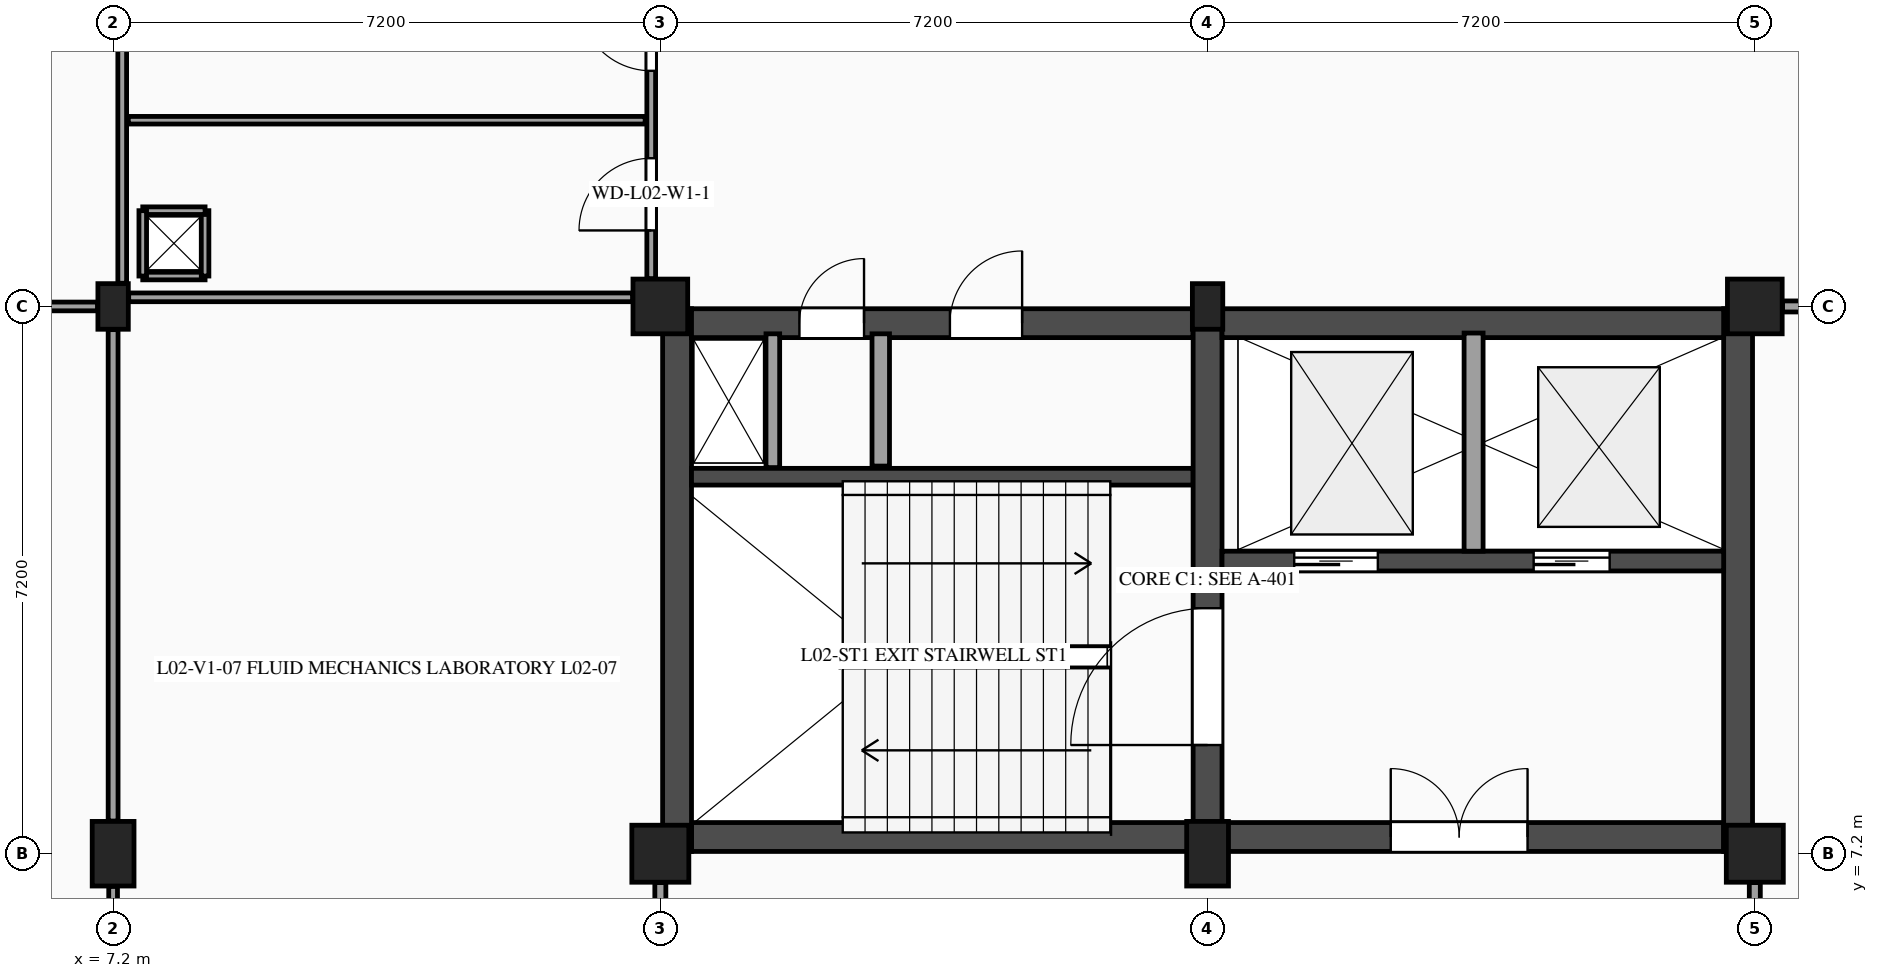
"""IFC4 building model, lengths in metres.
Left out: names, types, materials, properties, quantities, classifications, styles, units other than length and angle.
Written with IfcOpenShell. Run it as: python <this file> out.ifc"""

import sys

from ifc_helpers import new_model, si_unit, direction, frame, frame_2d, origin, origin_2d, place, context, subcontext, project, spatial, rectangle, extrude, element, fill, save


model = new_model("IFC4")
c1 = context("Model", 3, precision=1e-05, world=origin(), true_north=direction((0.0, 1.0)))
c2 = subcontext(c1, "Body", "Model", "MODEL_VIEW")
j1 = project(units=[si_unit("LENGTHUNIT", "METRE"), si_unit("PLANEANGLEUNIT", "RADIAN")], contexts=[c1])
p1 = place(None, origin())
s1 = spatial("IfcSite", under=j1, at=p1, CompositionType="ELEMENT")
p2 = place(p1, origin())
s2 = spatial("IfcBuilding", under=s1, at=p2, CompositionType="ELEMENT")
p3 = place(p2, frame((0.0, 0.0, 9.9)))
s3 = spatial("IfcBuildingStorey", under=s2, at=p3, CompositionType="ELEMENT", Elevation=9.9)
p4 = place(p3, frame((7.2, 7.2, 0.0), z_axis=(0.0, 0.0, 1.0), x_axis=(1.0, 0.0, 0.0)))
e1 = element("IfcColumn", 1, at=p4, inside=s3, PredefinedType="COLUMN", context=c2, shape_type="SweptSolid", body=[
    extrude(rectangle(XDim=0.55, YDim=0.85, at=origin_2d()), origin(), (0.0, 0.0, 1.0), 4.5),
])
p5 = place(p3, frame((7.2, 14.4, 0.0), z_axis=(0.0, 0.0, 1.0), x_axis=(1.0, 0.0, 0.0)))
e2 = element("IfcColumn", 2, at=p5, inside=s3, PredefinedType="PILASTER", context=c2, shape_type="SweptSolid", body=[
    extrude(rectangle(XDim=0.4, YDim=0.6, at=origin_2d()), origin(), (0.0, 0.0, 1.0), 4.5),
])
p6 = place(p3, frame((14.4, 7.2, 0.0), z_axis=(0.0, 0.0, 1.0), x_axis=(1.0, 0.0, 0.0)))
e3 = element("IfcColumn", 3, at=p6, inside=s3, PredefinedType="COLUMN", context=c2, shape_type="SweptSolid", body=[
    extrude(rectangle(XDim=0.75, YDim=0.75, at=origin_2d()), origin(), (0.0, 0.0, 1.0), 4.5),
])
p7 = place(p3, frame((14.4, 14.4, 0.0), z_axis=(0.0, 0.0, 1.0), x_axis=(1.0, 0.0, 0.0)))
e4 = element("IfcColumn", 4, at=p7, inside=s3, PredefinedType="COLUMN", context=c2, shape_type="SweptSolid", body=[
    extrude(rectangle(XDim=0.72, YDim=0.72, at=origin_2d()), origin(), (0.0, 0.0, 1.0), 4.5),
])
p8 = place(p3, frame((21.6, 7.2, 0.0), z_axis=(0.0, 0.0, 1.0), x_axis=(1.0, 0.0, 0.0)))
e5 = element("IfcColumn", 5, at=p8, inside=s3, PredefinedType="COLUMN", context=c2, shape_type="SweptSolid", body=[
    extrude(rectangle(XDim=0.55, YDim=0.85, at=origin_2d()), origin(), (0.0, 0.0, 1.0), 4.5),
])
p9 = place(p3, frame((21.6, 14.4, 0.0), z_axis=(0.0, 0.0, 1.0), x_axis=(1.0, 0.0, 0.0)))
e6 = element("IfcColumn", 6, at=p9, inside=s3, PredefinedType="PILASTER", context=c2, shape_type="SweptSolid", body=[
    extrude(rectangle(XDim=0.4, YDim=0.6, at=origin_2d()), origin(), (0.0, 0.0, 1.0), 4.5),
])
p10 = place(p3, frame((28.8, 7.2, 0.0), z_axis=(0.0, 0.0, 1.0), x_axis=(1.0, 0.0, 0.0)))
e7 = element("IfcColumn", 7, at=p10, inside=s3, PredefinedType="COLUMN", context=c2, shape_type="SweptSolid", body=[
    extrude(rectangle(XDim=0.75, YDim=0.75, at=origin_2d()), origin(), (0.0, 0.0, 1.0), 4.5),
])
p11 = place(p3, frame((28.8, 14.4, 0.0), z_axis=(0.0, 0.0, 1.0), x_axis=(1.0, 0.0, 0.0)))
e8 = element("IfcColumn", 8, at=p11, inside=s3, PredefinedType="COLUMN", context=c2, shape_type="SweptSolid", body=[
    extrude(rectangle(XDim=0.72, YDim=0.72, at=origin_2d()), origin(), (0.0, 0.0, 1.0), 4.5),
])
p12 = place(p3, frame((14.81, 7.42, 0.0), z_axis=(0.0, 0.0, 1.0), x_axis=(1.0, 0.0, 0.0)))
e9 = element("IfcWall", 9, at=p12, inside=s3, PredefinedType="SHEAR", context=c2, shape_type="SweptSolid", body=[
    extrude(rectangle(XDim=6.6, YDim=0.38, at=frame_2d((3.3, 0.0))), origin(), (0.0, 0.0, 1.0), 4.225),
])
p13 = place(p3, frame((14.62, 14.37, 0.0), z_axis=(0.0, 0.0, 1.0), x_axis=(0.0, -1.0, 0.0)))
e10 = element("IfcWall", 10, at=p13, inside=s3, PredefinedType="SHEAR", context=c2, shape_type="SweptSolid", body=[
    extrude(rectangle(XDim=7.14, YDim=0.38, at=frame_2d((3.57, 0.0))), origin(), (0.0, 0.0, 1.0), 4.225),
])
p14 = place(p3, frame((14.81, 14.18, 0.0), z_axis=(0.0, 0.0, 1.0), x_axis=(1.0, 0.0, 0.0)))
e11 = element("IfcWall", 11, at=p14, inside=s3, PredefinedType="SHEAR", context=c2, shape_type="SweptSolid", body=[
    extrude(rectangle(XDim=6.6, YDim=0.38, at=frame_2d((3.3, 0.0))), origin(), (0.0, 0.0, 1.0), 4.225),
])
p15 = place(p14, frame((1.42, 0.0, 0.0)))
e12 = element("IfcOpeningElement", 12, at=p15, cuts=e11, PredefinedType="OPENING", context=c2, shape_type="SweptSolid", body=[
    extrude(rectangle(XDim=0.85, YDim=2.1, at=frame_2d((0.425, 1.05))), frame((0.0, 0.2, 0.0), z_axis=(0.0, -1.0, 0.0), x_axis=(1.0, 0.0, 0.0)), (0.0, 0.0, 1.0), 0.4),
])
p16 = place(p14, frame((3.4, 0.0, 0.0)))
e13 = element("IfcOpeningElement", 13, at=p16, cuts=e11, PredefinedType="OPENING", context=c2, shape_type="SweptSolid", body=[
    extrude(rectangle(XDim=0.95, YDim=2.15, at=frame_2d((0.475, 1.075))), frame((0.0, 0.2, 0.0), z_axis=(0.0, -1.0, 0.0), x_axis=(1.0, 0.0, 0.0)), (0.0, 0.0, 1.0), 0.4),
])
p17 = place(p3, frame((14.81, 12.16, 0.0), z_axis=(0.0, 0.0, 1.0), x_axis=(1.0, 0.0, 0.0)))
e14 = element("IfcWall", 14, at=p17, inside=s3, PredefinedType="SHEAR", context=c2, shape_type="SweptSolid", body=[
    extrude(rectangle(XDim=6.6, YDim=0.22, at=frame_2d((3.3, 0.0))), origin(), (0.0, 0.0, 1.0), 4.225),
])
p18 = place(p3, frame((17.3, 12.3, 0.0), z_axis=(0.0, 0.0, 1.0), x_axis=(0.0, 1.0, 0.0)))
e15 = element("IfcWall", 15, at=p18, inside=s3, PredefinedType="PARTITIONING", context=c2, shape_type="SweptSolid", body=[
    extrude(rectangle(XDim=1.74, YDim=0.23, at=frame_2d((0.87, 0.0))), origin(), (0.0, 0.0, 1.0), 4.225),
])
p19 = place(p3, frame((15.88, 12.28, 0.0), z_axis=(0.0, 0.0, 1.0), x_axis=(0.0, 1.0, 0.0)))
e16 = element("IfcWall", 16, at=p19, inside=s3, PredefinedType="PARTITIONING", context=c2, shape_type="SweptSolid", body=[
    extrude(rectangle(XDim=1.76, YDim=0.18, at=frame_2d((0.88, 0.0))), origin(), (0.0, 0.0, 1.0), 4.225),
])
p20 = place(p3, frame((21.6, 7.23, 0.0), z_axis=(0.0, 0.0, 1.0), x_axis=(0.0, 1.0, 0.0)))
e17 = element("IfcWall", 17, at=p20, inside=s3, PredefinedType="SHEAR", context=c2, shape_type="SweptSolid", body=[
    extrude(rectangle(XDim=7.14, YDim=0.38, at=frame_2d((3.57, 0.0))), origin(), (0.0, 0.0, 1.0), 4.225),
])
p21 = place(p20, frame((1.4, 0.0, 0.0)))
e18 = element("IfcOpeningElement", 18, at=p21, cuts=e17, PredefinedType="OPENING", context=c2, shape_type="SweptSolid", body=[
    extrude(rectangle(XDim=1.8, YDim=2.2, at=frame_2d((0.9, 1.1))), frame((0.0, 0.2, 0.0), z_axis=(0.0, -1.0, 0.0), x_axis=(1.0, 0.0, 0.0)), (0.0, 0.0, 1.0), 0.4),
])
p22 = place(p3, frame((21.79, 7.42, 0.0), z_axis=(0.0, 0.0, 1.0), x_axis=(1.0, 0.0, 0.0)))
e19 = element("IfcWall", 19, at=p22, inside=s3, PredefinedType="SHEAR", context=c2, shape_type="SweptSolid", body=[
    extrude(rectangle(XDim=6.6, YDim=0.38, at=frame_2d((3.3, 0.0))), origin(), (0.0, 0.0, 1.0), 4.225),
])
p23 = place(p22, frame((2.22, 0.0, 0.0)))
e20 = element("IfcOpeningElement", 20, at=p23, cuts=e19, PredefinedType="OPENING", context=c2, shape_type="SweptSolid", body=[
    extrude(rectangle(XDim=1.8, YDim=2.2, at=frame_2d((0.9, 1.1))), frame((0.0, 0.2, 0.0), z_axis=(0.0, -1.0, 0.0), x_axis=(1.0, 0.0, 0.0)), (0.0, 0.0, 1.0), 0.4),
])
p24 = place(p3, frame((28.58, 7.23, 0.0), z_axis=(0.0, 0.0, 1.0), x_axis=(0.0, 1.0, 0.0)))
e21 = element("IfcWall", 21, at=p24, inside=s3, PredefinedType="SHEAR", context=c2, shape_type="SweptSolid", body=[
    extrude(rectangle(XDim=7.14, YDim=0.38, at=frame_2d((3.57, 0.0))), origin(), (0.0, 0.0, 1.0), 4.225),
])
p25 = place(p3, frame((21.79, 14.18, 0.0), z_axis=(0.0, 0.0, 1.0), x_axis=(1.0, 0.0, 0.0)))
e22 = element("IfcWall", 22, at=p25, inside=s3, PredefinedType="SHEAR", context=c2, shape_type="SweptSolid", body=[
    extrude(rectangle(XDim=6.6, YDim=0.38, at=frame_2d((3.3, 0.0))), origin(), (0.0, 0.0, 1.0), 4.225),
])
p26 = place(p3, frame((21.79, 11.05, 0.0), z_axis=(0.0, 0.0, 1.0), x_axis=(1.0, 0.0, 0.0)))
e23 = element("IfcWall", 23, at=p26, inside=s3, PredefinedType="SHEAR", context=c2, shape_type="SweptSolid", body=[
    extrude(rectangle(XDim=6.6, YDim=0.26, at=frame_2d((3.3, 0.0))), origin(), (0.0, 0.0, 1.0), 4.225),
])
p27 = place(p26, frame((0.95, 0.0, 0.0)))
e24 = element("IfcOpeningElement", 24, at=p27, cuts=e23, PredefinedType="OPENING", context=c2, shape_type="SweptSolid", body=[
    extrude(rectangle(XDim=1.1, YDim=2.2, at=frame_2d((0.55, 1.1))), frame((0.0, 0.14, 0.0), z_axis=(0.0, -1.0, 0.0), x_axis=(1.0, 0.0, 0.0)), (0.0, 0.0, 1.0), 0.28),
])
p28 = place(p26, frame((4.1, 0.0, 0.0)))
e25 = element("IfcOpeningElement", 25, at=p28, cuts=e23, PredefinedType="OPENING", context=c2, shape_type="SweptSolid", body=[
    extrude(rectangle(XDim=1.0, YDim=2.15, at=frame_2d((0.5, 1.075))), frame((0.0, 0.14, 0.0), z_axis=(0.0, -1.0, 0.0), x_axis=(1.0, 0.0, 0.0)), (0.0, 0.0, 1.0), 0.28),
])
p29 = place(p3, frame((25.1, 11.18, 0.0), z_axis=(0.0, 0.0, 1.0), x_axis=(0.0, 1.0, 0.0)))
e26 = element("IfcWall", 26, at=p29, inside=s3, PredefinedType="PARTITIONING", context=c2, shape_type="SweptSolid", body=[
    extrude(rectangle(XDim=2.87, YDim=0.25, at=frame_2d((1.435, 0.0))), origin(), (0.0, 0.0, 1.0), 4.225),
])
p30 = place(p3, frame((7.405, 14.52, 0.0), z_axis=(0.0, 0.0, 1.0), x_axis=(1.0, 0.0, 0.0)))
e27 = element("IfcWall", 27, at=p30, inside=s3, PredefinedType="PARTITIONING", context=c2, shape_type="SweptSolid", body=[
    extrude(rectangle(XDim=6.63, YDim=0.115, at=frame_2d((3.315, 0.0))), origin(), (0.0, 0.0, 1.0), 3.5),
])
p31 = place(p3, frame((7.32, 14.705, 0.0), z_axis=(0.0, 0.0, 1.0), x_axis=(0.0, 1.0, 0.0)))
e28 = element("IfcWall", 28, at=p31, inside=s3, PredefinedType="PARTITIONING", context=c2, shape_type="SweptSolid", body=[
    extrude(rectangle(XDim=6.5, YDim=0.115, at=frame_2d((3.25, 0.0))), origin(), (0.0, 0.0, 1.0), 3.53),
])
p32 = place(p3, frame((14.28, 14.765, 0.0), z_axis=(0.0, 0.0, 1.0), x_axis=(0.0, 1.0, 0.0)))
e29 = element("IfcWall", 29, at=p32, inside=s3, PredefinedType="PARTITIONING", context=c2, shape_type="SweptSolid", body=[
    extrude(rectangle(XDim=6.48, YDim=0.115, at=frame_2d((3.24, 0.0))), origin(), (0.0, 0.0, 1.0), 3.53),
])
p33 = place(p32, frame((0.635, 0.0, 0.0)))
e30 = element("IfcOpeningElement", 30, at=p33, cuts=e29, PredefinedType="OPENING", context=c2, shape_type="SweptSolid", body=[
    extrude(rectangle(XDim=0.95, YDim=2.1, at=frame_2d((0.475, 1.05))), frame((0.0, 0.067, 0.0), z_axis=(0.0, -1.0, 0.0), x_axis=(1.0, 0.0, 0.0)), (0.0, 0.0, 1.0), 0.135),
])
p34 = place(p32, frame((2.735, 0.0, 0.0)))
e31 = element("IfcOpeningElement", 31, at=p34, cuts=e29, PredefinedType="OPENING", context=c2, shape_type="SweptSolid", body=[
    extrude(rectangle(XDim=0.95, YDim=2.1, at=frame_2d((0.475, 1.05))), frame((0.0, 0.067, 0.0), z_axis=(0.0, -1.0, 0.0), x_axis=(1.0, 0.0, 0.0)), (0.0, 0.0, 1.0), 0.135),
])
p35 = place(p32, frame((4.885, 0.0, 0.0)))
e32 = element("IfcOpeningElement", 32, at=p35, cuts=e29, PredefinedType="OPENING", context=c2, shape_type="SweptSolid", body=[
    extrude(rectangle(XDim=1.0, YDim=2.15, at=frame_2d((0.5, 1.075))), frame((0.0, 0.067, 0.0), z_axis=(0.0, -1.0, 0.0), x_axis=(1.0, 0.0, 0.0)), (0.0, 0.0, 1.0), 0.135),
])
p36 = place(p3, frame((7.4, 16.85, 0.0), z_axis=(0.0, 0.0, 1.0), x_axis=(1.0, 0.0, 0.0)))
e33 = element("IfcWall", 33, at=p36, inside=s3, PredefinedType="PARTITIONING", context=c2, shape_type="SweptSolid", body=[
    extrude(rectangle(XDim=6.8, YDim=0.1, at=frame_2d((3.4, 0.0))), origin(), (0.0, 0.0, 1.0), 4.225),
])
p37 = place(p3, frame((7.59, 14.8, 0.0), z_axis=(0.0, 0.0, 1.0), x_axis=(1.0, 0.0, 0.0)))
e34 = element("IfcWall", 34, at=p37, inside=s3, PredefinedType="PARTITIONING", context=c2, shape_type="SweptSolid", body=[
    extrude(rectangle(XDim=0.82, YDim=0.1, at=frame_2d((0.41, 0.0))), origin(), (0.0, 0.0, 1.0), 4.225),
])
p38 = place(p3, frame((8.41, 14.8, 0.0), z_axis=(0.0, 0.0, 1.0), x_axis=(0.0, 1.0, 0.0)))
e35 = element("IfcWall", 35, at=p38, inside=s3, PredefinedType="PARTITIONING", context=c2, shape_type="SweptSolid", body=[
    extrude(rectangle(XDim=0.86, YDim=0.1, at=frame_2d((0.43, 0.0))), origin(), (0.0, 0.0, 1.0), 4.225),
])
p39 = place(p3, frame((8.41, 15.66, 0.0), z_axis=(0.0, 0.0, 1.0), x_axis=(-1.0, 0.0, 0.0)))
e36 = element("IfcWall", 36, at=p39, inside=s3, PredefinedType="PARTITIONING", context=c2, shape_type="SweptSolid", body=[
    extrude(rectangle(XDim=0.82, YDim=0.1, at=frame_2d((0.41, 0.0))), origin(), (0.0, 0.0, 1.0), 4.225),
])
p40 = place(p3, frame((7.59, 15.66, 0.0), z_axis=(0.0, 0.0, 1.0), x_axis=(0.0, -1.0, 0.0)))
e37 = element("IfcWall", 37, at=p40, inside=s3, PredefinedType="PARTITIONING", context=c2, shape_type="SweptSolid", body=[
    extrude(rectangle(XDim=0.86, YDim=0.1, at=frame_2d((0.43, 0.0))), origin(), (0.0, 0.0, 1.0), 4.225),
])
p41 = place(p3, frame((7.2, 0.355, 0.0), z_axis=(0.0, 0.0, 1.0), x_axis=(0.0, 1.0, 0.0)))
e38 = element("IfcWall", 38, at=p41, inside=s3, PredefinedType="PARTITIONING", context=c2, shape_type="SweptSolid", body=[
    extrude(rectangle(XDim=6.415, YDim=0.115, at=frame_2d((3.208, 0.0))), origin(), (0.0, 0.0, 1.0), 3.54),
])
p42 = place(p41, frame((2.248, 0.0, 0.0)))
e39 = element("IfcOpeningElement", 39, at=p42, cuts=e38, PredefinedType="OPENING", context=c2, shape_type="SweptSolid", body=[
    extrude(rectangle(XDim=1.92, YDim=2.35, at=frame_2d((0.96, 1.175))), frame((0.0, 0.067, 0.0), z_axis=(0.0, -1.0, 0.0), x_axis=(1.0, 0.0, 0.0)), (0.0, 0.0, 1.0), 0.135),
])
p43 = place(p3, frame((7.2, 7.63, 0.0), z_axis=(0.0, 0.0, 1.0), x_axis=(0.0, 1.0, 0.0)))
e40 = element("IfcWall", 40, at=p43, inside=s3, PredefinedType="PARTITIONING", context=c2, shape_type="SweptSolid", body=[
    extrude(rectangle(XDim=6.465, YDim=0.13, at=frame_2d((3.232, 0.0))), origin(), (0.0, 0.0, 1.0), 3.535),
])
p44 = place(p3, frame((0.365, 14.4, 0.0), z_axis=(0.0, 0.0, 1.0), x_axis=(1.0, 0.0, 0.0)))
e41 = element("IfcWall", 41, at=p44, inside=s3, PredefinedType="PARTITIONING", context=c2, shape_type="SweptSolid", body=[
    extrude(rectangle(XDim=6.63, YDim=0.115, at=frame_2d((3.315, 0.0))), origin(), (0.0, 0.0, 1.0), 3.485),
])
p45 = place(p44, frame((2.435, 0.0, 0.0)))
e42 = element("IfcOpeningElement", 42, at=p45, cuts=e41, PredefinedType="OPENING", context=c2, shape_type="SweptSolid", body=[
    extrude(rectangle(XDim=1.76, YDim=2.3, at=frame_2d((0.88, 1.15))), frame((0.0, 0.067, 0.0), z_axis=(0.0, -1.0, 0.0), x_axis=(1.0, 0.0, 0.0)), (0.0, 0.0, 1.0), 0.135),
])
p46 = place(p3, frame((14.4, 0.395, 0.0), z_axis=(0.0, 0.0, 1.0), x_axis=(0.0, 1.0, 0.0)))
e43 = element("IfcWall", 43, at=p46, inside=s3, PredefinedType="PARTITIONING", context=c2, shape_type="SweptSolid", body=[
    extrude(rectangle(XDim=6.425, YDim=0.145, at=frame_2d((3.212, 0.0))), origin(), (0.0, 0.0, 1.0), 3.54),
])
p47 = place(p46, frame((2.472, 0.0, 0.0)))
e44 = element("IfcOpeningElement", 44, at=p47, cuts=e43, PredefinedType="OPENING", context=c2, shape_type="SweptSolid", body=[
    extrude(rectangle(XDim=1.48, YDim=2.28, at=frame_2d((0.74, 1.14))), frame((0.0, 0.083, 0.0), z_axis=(0.0, -1.0, 0.0), x_axis=(1.0, 0.0, 0.0)), (0.0, 0.0, 1.0), 0.165),
])
p48 = place(p3, frame((28.8, 0.395, 0.0), z_axis=(0.0, 0.0, 1.0), x_axis=(0.0, 1.0, 0.0)))
e45 = element("IfcWall", 45, at=p48, inside=s3, PredefinedType="PARTITIONING", context=c2, shape_type="SweptSolid", body=[
    extrude(rectangle(XDim=6.425, YDim=0.145, at=frame_2d((3.212, 0.0))), origin(), (0.0, 0.0, 1.0), 3.54),
])
p49 = place(p48, frame((2.433, 0.0, 0.0)))
e46 = element("IfcOpeningElement", 46, at=p49, cuts=e45, PredefinedType="OPENING", context=c2, shape_type="SweptSolid", body=[
    extrude(rectangle(XDim=1.56, YDim=2.25, at=frame_2d((0.78, 1.125))), frame((0.0, 0.083, 0.0), z_axis=(0.0, -1.0, 0.0), x_axis=(1.0, 0.0, 0.0)), (0.0, 0.0, 1.0), 0.165),
])
p50 = place(p3, frame((29.165, 14.4, 0.0), z_axis=(0.0, 0.0, 1.0), x_axis=(1.0, 0.0, 0.0)))
e47 = element("IfcWall", 47, at=p50, inside=s3, PredefinedType="PARTITIONING", context=c2, shape_type="SweptSolid", body=[
    extrude(rectangle(XDim=6.63, YDim=0.145, at=frame_2d((3.315, 0.0))), origin(), (0.0, 0.0, 1.0), 3.565),
])
p51 = place(p15, origin())
e48 = element("IfcDoor", 48, at=p51, inside=s3, OperationType="SINGLE_SWING_RIGHT", PredefinedType="DOOR", context=c2, shape_type="SweptSolid", body=[
    extrude(rectangle(XDim=0.85, YDim=2.1, at=frame_2d((0.425, 1.05))), frame((0.0, 0.025, 0.0), z_axis=(0.0, -1.0, 0.0), x_axis=(1.0, 0.0, 0.0)), (0.0, 0.0, 1.0), 0.05),
])
fill(e12, e48)
p52 = place(p21, origin())
e49 = element("IfcDoor", 49, at=p52, inside=s3, OperationType="SINGLE_SWING_LEFT", PredefinedType="DOOR", context=c2, shape_type="SweptSolid", body=[
    extrude(rectangle(XDim=1.8, YDim=2.2, at=frame_2d((0.9, 1.1))), frame((0.0, 0.025, 0.0), z_axis=(0.0, -1.0, 0.0), x_axis=(1.0, 0.0, 0.0)), (0.0, 0.0, 1.0), 0.05),
])
fill(e18, e49)
p53 = place(p16, origin())
e50 = element("IfcDoor", 50, at=p53, inside=s3, OperationType="SINGLE_SWING_RIGHT", PredefinedType="DOOR", context=c2, shape_type="SweptSolid", body=[
    extrude(rectangle(XDim=0.95, YDim=2.15, at=frame_2d((0.475, 1.075))), frame((0.0, 0.025, 0.0), z_axis=(0.0, -1.0, 0.0), x_axis=(1.0, 0.0, 0.0)), (0.0, 0.0, 1.0), 0.05),
])
fill(e13, e50)
p54 = place(p27, origin())
e51 = element("IfcDoor", 51, at=p54, inside=s3, OperationType="SLIDING_TO_LEFT", PredefinedType="DOOR", context=c2, shape_type="SweptSolid", body=[
    extrude(rectangle(XDim=1.1, YDim=2.2, at=frame_2d((0.55, 1.1))), frame((0.0, 0.025, 0.0), z_axis=(0.0, -1.0, 0.0), x_axis=(1.0, 0.0, 0.0)), (0.0, 0.0, 1.0), 0.05),
])
fill(e24, e51)
p55 = place(p28, origin())
e52 = element("IfcDoor", 52, at=p55, inside=s3, OperationType="SLIDING_TO_RIGHT", PredefinedType="DOOR", context=c2, shape_type="SweptSolid", body=[
    extrude(rectangle(XDim=1.0, YDim=2.15, at=frame_2d((0.5, 1.075))), frame((0.0, 0.025, 0.0), z_axis=(0.0, -1.0, 0.0), x_axis=(1.0, 0.0, 0.0)), (0.0, 0.0, 1.0), 0.05),
])
fill(e25, e52)
p56 = place(p23, origin())
e53 = element("IfcDoor", 53, at=p56, inside=s3, OperationType="DOUBLE_DOOR_SINGLE_SWING", PredefinedType="DOOR", context=c2, shape_type="SweptSolid", body=[
    extrude(rectangle(XDim=1.8, YDim=2.2, at=frame_2d((0.9, 1.1))), frame((0.0, 0.025, 0.0), z_axis=(0.0, -1.0, 0.0), x_axis=(1.0, 0.0, 0.0)), (0.0, 0.0, 1.0), 0.05),
])
fill(e20, e53)
p57 = place(p33, origin())
e54 = element("IfcDoor", 54, at=p57, inside=s3, OperationType="SINGLE_SWING_LEFT", PredefinedType="DOOR", context=c2, shape_type="SweptSolid", body=[
    extrude(rectangle(XDim=0.95, YDim=2.1, at=frame_2d((0.475, 1.05))), frame((0.0, 0.025, 0.0), z_axis=(0.0, -1.0, 0.0), x_axis=(1.0, 0.0, 0.0)), (0.0, 0.0, 1.0), 0.05),
])
fill(e30, e54)
p58 = place(p34, origin())
e55 = element("IfcDoor", 55, at=p58, inside=s3, OperationType="SINGLE_SWING_RIGHT", PredefinedType="DOOR", context=c2, shape_type="SweptSolid", body=[
    extrude(rectangle(XDim=0.95, YDim=2.1, at=frame_2d((0.475, 1.05))), frame((0.0, 0.025, 0.0), z_axis=(0.0, -1.0, 0.0), x_axis=(1.0, 0.0, 0.0)), (0.0, 0.0, 1.0), 0.05),
])
fill(e31, e55)
save(model, sys.argv[1])
